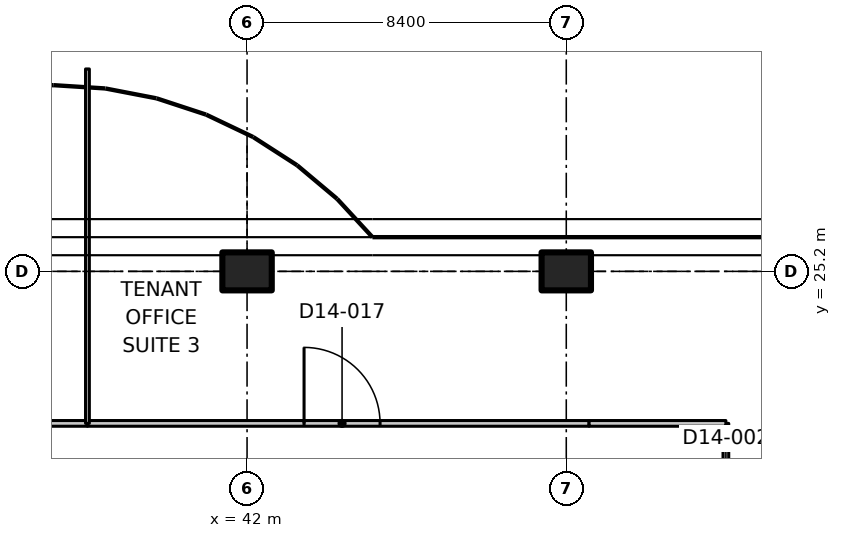
"""IFC4 building model, lengths in metres.
Left out: names, types, materials, properties, quantities, classifications, styles, units other than length and angle.
Written with IfcOpenShell. Run it as: python <this file> out.ifc"""

import sys

from ifc_helpers import new_model, si_unit, direction, frame, frame_2d, origin, origin_2d, place, context, subcontext, project, spatial, polyline, rectangle, outline, extrude, element, fill, save


model = new_model("IFC4")
c1 = context("Model", 3, precision=1e-05, world=origin(), true_north=direction((0.0, 1.0)))
c2 = subcontext(c1, "Body", "Model", "MODEL_VIEW")
j1 = project(units=[si_unit("LENGTHUNIT", "METRE"), si_unit("PLANEANGLEUNIT", "RADIAN")], contexts=[c1])
p1 = place(None, origin())
s1 = spatial("IfcSite", under=j1, at=p1, CompositionType="ELEMENT")
p2 = place(p1, origin())
s2 = spatial("IfcBuilding", under=s1, at=p2, CompositionType="ELEMENT")
p3 = place(p2, frame((0.0, 0.0, 106.1)))
s3 = spatial("IfcBuildingStorey", under=s2, at=p3, CompositionType="ELEMENT", Elevation=106.1)
for number, where, z_axis, x_axis in (
    (1, (42.0, 25.2, 0.0), (0.0, 0.0, 1.0), (0.0, 1.0, 0.0)),
    (2, (50.4, 25.2, 0.0), (0.0, 0.0, 1.0), (0.0, 1.0, 0.0)),
):
    element("IfcColumn", number, at=place(p3, frame(where, z_axis=z_axis, x_axis=x_axis)), inside=s3, PredefinedType="COLUMN", context=c2, shape_type="SweptSolid", body=[
        extrude(rectangle(XDim=1.0, YDim=1.3, at=origin_2d()), origin(), (0.0, 0.0, 1.0), 3.35),
    ])
p4 = place(p3, frame((54.6, 21.2, 0.0), z_axis=(0.0, 0.0, 1.0), x_axis=(0.0, -1.0, 0.0)))
e3 = element("IfcWall", 3, at=p4, inside=s3, PredefinedType="PARTITIONING", context=c2, shape_type="SweptSolid", body=[
    extrude(rectangle(XDim=8.2, YDim=0.15, at=frame_2d((4.1, 0.0))), origin(), (0.0, 0.0, 1.0), 3.33),
])
p5 = place(p4, frame((3.2, 0.0, 0.0)))
e4 = element("IfcOpeningElement", 4, at=p5, cuts=e3, PredefinedType="OPENING", context=c2, shape_type="SweptSolid", body=[
    extrude(rectangle(XDim=2.0, YDim=2.4, at=frame_2d((1.0, 1.2))), frame((0.0, 0.085, 0.0), z_axis=(0.0, -1.0, 0.0), x_axis=(1.0, 0.0, 0.0)), (0.0, 0.0, 1.0), 0.17),
])
p6 = place(p3, frame((29.4, 21.2, 0.0), z_axis=(0.0, 0.0, 1.0), x_axis=(1.0, 0.0, 0.0)))
e5 = element("IfcWall", 5, at=p6, inside=s3, PredefinedType="PARTITIONING", context=c2, shape_type="SweptSolid", body=[
    extrude(rectangle(XDim=8.4, YDim=0.15, at=frame_2d((4.2, 0.0))), origin(), (0.0, 0.0, 1.0), 3.33),
])
p7 = place(p6, frame((3.3, 0.0, 0.0)))
e6 = element("IfcOpeningElement", 6, at=p7, cuts=e5, PredefinedType="OPENING", context=c2, shape_type="SweptSolid", body=[
    extrude(rectangle(XDim=1.6, YDim=2.1, at=frame_2d((0.8, 1.05))), frame((0.0, 0.085, 0.0), z_axis=(0.0, -1.0, 0.0), x_axis=(1.0, 0.0, 0.0)), (0.0, 0.0, 1.0), 0.17),
])
p8 = place(p3, frame((37.8, 21.2, 0.0), z_axis=(0.0, 0.0, 1.0), x_axis=(1.0, 0.0, 0.0)))
e7 = element("IfcWall", 7, at=p8, inside=s3, PredefinedType="PARTITIONING", context=c2, shape_type="SweptSolid", body=[
    extrude(rectangle(XDim=13.2, YDim=0.15, at=frame_2d((6.6, 0.0))), origin(), (0.0, 0.0, 1.0), 3.33),
])
p9 = place(p8, frame((5.7, 0.0, 0.0)))
e8 = element("IfcOpeningElement", 8, at=p9, cuts=e7, PredefinedType="OPENING", context=c2, shape_type="SweptSolid", body=[
    extrude(rectangle(XDim=2.0, YDim=2.4, at=frame_2d((1.0, 1.2))), frame((0.0, 0.085, 0.0), z_axis=(0.0, -1.0, 0.0), x_axis=(1.0, 0.0, 0.0)), (0.0, 0.0, 1.0), 0.17),
])
p10 = place(p3, frame((51.0, 21.2, 0.0), z_axis=(0.0, 0.0, 1.0), x_axis=(1.0, 0.0, 0.0)))
e9 = element("IfcWall", 9, at=p10, inside=s3, PredefinedType="PARTITIONING", context=c2, shape_type="SweptSolid", body=[
    extrude(rectangle(XDim=3.6, YDim=0.15, at=frame_2d((1.8, 0.0))), origin(), (0.0, 0.0, 1.0), 3.33),
])
p11 = place(p3, frame((37.8, 30.526, 0.0), z_axis=(0.0, 0.0, 1.0), x_axis=(0.0, -1.0, 0.0)))
e10 = element("IfcWall", 10, at=p11, inside=s3, PredefinedType="PARTITIONING", context=c2, shape_type="SweptSolid", body=[
    extrude(outline(polyline([(0.0, 0.0), (9.326, 0.0), (9.326, 3.33), (5.776, 3.33), (5.774, 2.98), (4.878, 2.98), (4.876, 3.33), (0.283, 3.33), (0.0, 3.33), (0.0, 0.0)])), frame((0.0, 0.05, 0.0), z_axis=(0.0, -1.0, 0.0), x_axis=(1.0, 0.0, 0.0)), (0.0, 0.0, 1.0), 0.1),
])
p12 = place(p9, origin())
e11 = element("IfcDoor", 11, at=p12, inside=s3, OperationType="DOUBLE_DOOR_SINGLE_SWING", PredefinedType="DOOR", context=c2, shape_type="SweptSolid", body=[
    extrude(rectangle(XDim=2.0, YDim=2.4, at=frame_2d((1.0, 1.2))), frame((0.0, 0.025, 0.0), z_axis=(0.0, -1.0, 0.0), x_axis=(1.0, 0.0, 0.0)), (0.0, 0.0, 1.0), 0.05),
])
fill(e8, e11)
save(model, sys.argv[1])
